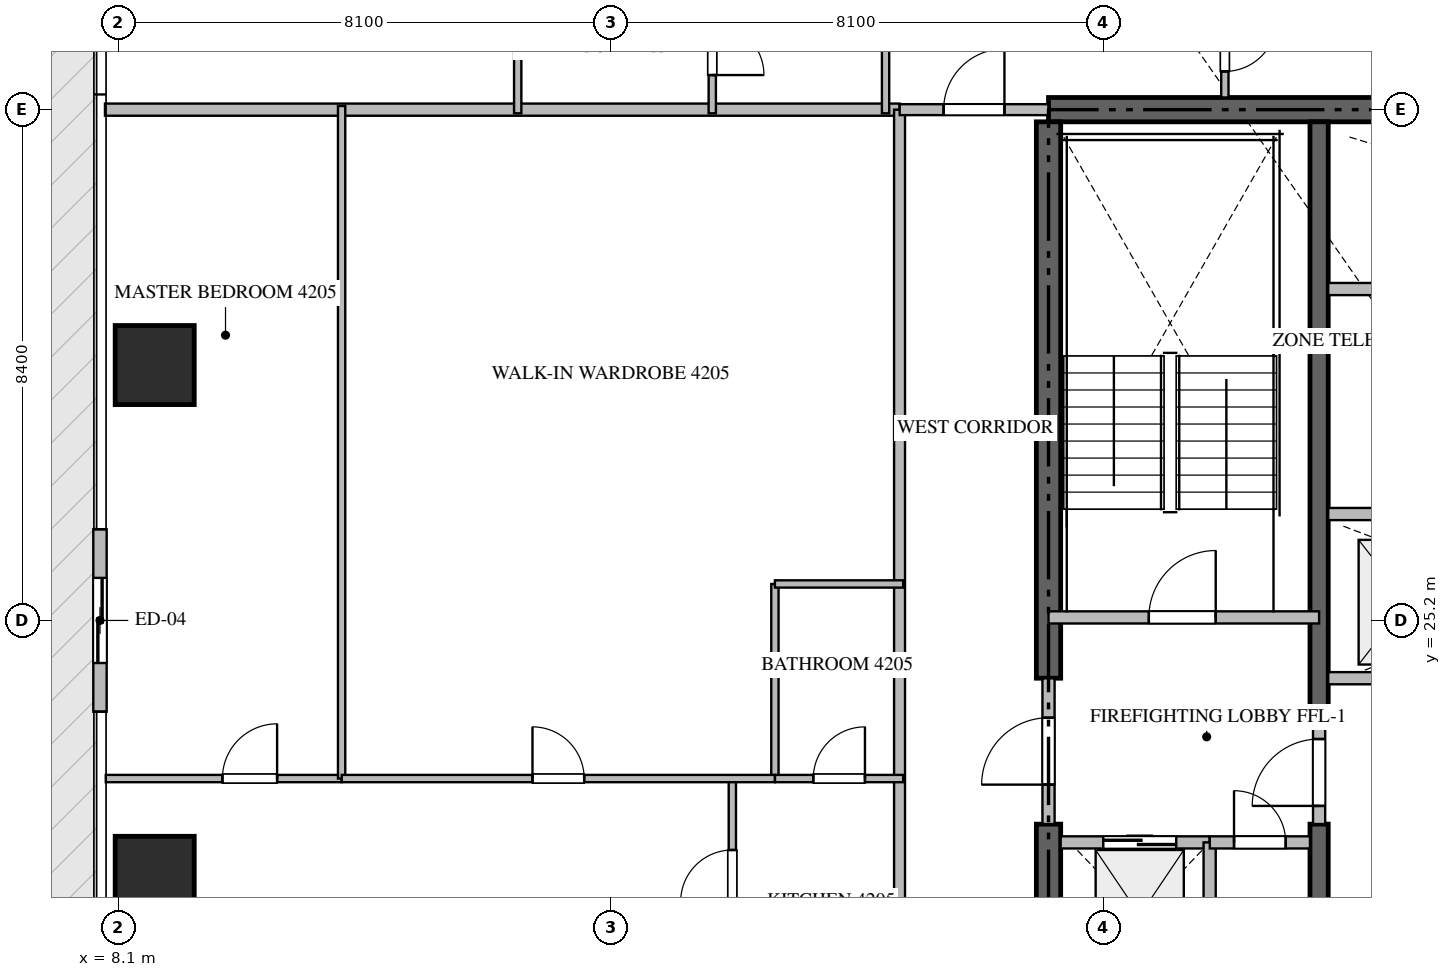
"""IFC4 building model, lengths in metres.
Left out: names, types, materials, properties, quantities, classifications, styles, units other than length and angle.
Written with IfcOpenShell. Run it as: python <this file> out.ifc"""

import sys

from ifc_helpers import new_model, si_unit, direction, frame, frame_2d, origin, origin_2d, place, context, subcontext, project, spatial, rectangle, extrude, source, transform, mapped, element, fill, save


model = new_model("IFC4")
c1 = context("Model", 3, precision=1e-05, world=origin(), true_north=direction((0.0, 1.0)))
c2 = subcontext(c1, "Body", "Model", "MODEL_VIEW")
j1 = project(units=[si_unit("LENGTHUNIT", "METRE"), si_unit("PLANEANGLEUNIT", "RADIAN")], contexts=[c1])
p1 = place(None, origin())
s1 = spatial("IfcSite", under=j1, at=p1, CompositionType="ELEMENT")
p2 = place(p1, origin())
s2 = spatial("IfcBuilding", under=s1, at=p2, CompositionType="ELEMENT")
p3 = place(p2, frame((0.0, 0.0, 168.9)))
s3 = spatial("IfcBuildingStorey", under=s2, at=p3, CompositionType="ELEMENT", Elevation=168.9)
p4 = place(p3, frame((41.4, 33.6, -0.26), z_axis=(0.0, 0.0, 1.0), x_axis=(-1.0, 0.0, 0.0)))
e1 = element("IfcWall", 1, at=p4, inside=s3, PredefinedType="SHEAR", context=c2, shape_type="SweptSolid", body=[
    extrude(rectangle(XDim=18.0, YDim=0.4, at=frame_2d((9.0, 0.0))), origin(), (0.0, 0.0, 1.0), 3.748),
])
p5 = place(p3, frame((23.4, 17.0, -0.26), z_axis=(0.0, 0.0, 1.0), x_axis=(0.0, 1.0, 0.0)))
e2 = element("IfcWall", 2, at=p5, inside=s3, PredefinedType="SHEAR", context=c2, shape_type="SweptSolid", body=[
    extrude(rectangle(XDim=4.85, YDim=0.4, at=frame_2d((2.425, 0.0))), origin(), (0.0, 0.0, 1.0), 3.748),
])
p6 = place(p3, frame((23.4, 24.25, -0.26), z_axis=(0.0, 0.0, 1.0), x_axis=(0.0, 1.0, 0.0)))
e3 = element("IfcWall", 3, at=p6, inside=s3, PredefinedType="SHEAR", context=c2, shape_type="SweptSolid", body=[
    extrude(rectangle(XDim=9.15, YDim=0.4, at=frame_2d((4.575, 0.0))), origin(), (0.0, 0.0, 1.0), 3.748),
])
p7 = place(p3, frame((27.85, 17.0, -0.26), z_axis=(0.0, 0.0, 1.0), x_axis=(0.0, 1.0, 0.0)))
e4 = element("IfcWall", 4, at=p7, inside=s3, PredefinedType="SHEAR", context=c2, shape_type="SweptSolid", body=[
    extrude(rectangle(XDim=4.85, YDim=0.3, at=frame_2d((2.425, 0.0))), origin(), (0.0, 0.0, 1.0), 3.748),
])
p8 = place(p3, frame((27.85, 23.55, -0.26), z_axis=(0.0, 0.0, 1.0), x_axis=(0.0, 1.0, 0.0)))
e5 = element("IfcWall", 5, at=p8, inside=s3, PredefinedType="SHEAR", context=c2, shape_type="SweptSolid", body=[
    extrude(rectangle(XDim=9.85, YDim=0.3, at=frame_2d((4.925, 0.0))), origin(), (0.0, 0.0, 1.0), 3.748),
])
m1 = source(origin(), c2, "Body", "SweptSolid", [
    extrude(rectangle(XDim=1.3, YDim=1.3, at=origin_2d()), origin(), (0.0, 0.0, 1.0), 3.75),
])
for number, where, z_axis, x_axis in (
    (6, (8.7, 21.0, -0.26), (0.0, 0.0, 1.0), (1.0, 0.0, 0.0)),
    (7, (8.7, 29.4, -0.26), (0.0, 0.0, 1.0), (1.0, 0.0, 0.0)),
):
    element("IfcColumn", number, at=place(p3, frame(where, z_axis=z_axis, x_axis=x_axis)), inside=s3, PredefinedType="COLUMN", context=c2, shape_type="MappedRepresentation", body=[
        mapped(m1, transform((0.0, 0.0, 0.0), scale=1.0)),
    ])
p9 = place(p3, frame((7.8, 26.7, 0.0), z_axis=(0.0, 0.0, 1.0), x_axis=(0.0, -1.0, 0.0)))
e8 = element("IfcWall", 8, at=p9, inside=s3, PredefinedType="ELEMENTEDWALL", context=c2, shape_type="SweptSolid", body=[
    extrude(rectangle(XDim=3.0, YDim=0.22, at=frame_2d((1.5, 0.0))), origin(), (0.0, 0.0, 1.0), 3.475),
])
p10 = place(p9, frame((0.8, 0.0, 0.0)))
e9 = element("IfcOpeningElement", 9, at=p10, cuts=e8, PredefinedType="OPENING", context=c2, shape_type="SweptSolid", body=[
    extrude(rectangle(XDim=1.4, YDim=2.25, at=frame_2d((0.7, 1.125))), frame((0.0, 0.12, 0.0), z_axis=(0.0, -1.0, 0.0), x_axis=(1.0, 0.0, 0.0)), (0.0, 0.0, 1.0), 0.24),
])
p11 = place(p3, frame((23.4, 25.25, 0.0), z_axis=(0.0, 0.0, 1.0), x_axis=(1.0, 0.0, 0.0)))
e10 = element("IfcWall", 10, at=p11, inside=s3, PredefinedType="STANDARD", context=c2, shape_type="SweptSolid", body=[
    extrude(rectangle(XDim=4.45, YDim=0.2, at=frame_2d((2.225, 0.0))), origin(), (0.0, 0.0, 1.0), 3.49),
])
p12 = place(p11, frame((1.65, 0.0, 0.0)))
e11 = element("IfcOpeningElement", 11, at=p12, cuts=e10, PredefinedType="OPENING", context=c2, shape_type="SweptSolid", body=[
    extrude(rectangle(XDim=1.1, YDim=2.15, at=frame_2d((0.55, 1.075))), frame((0.0, 0.11, 0.0), z_axis=(0.0, -1.0, 0.0), x_axis=(1.0, 0.0, 0.0)), (0.0, 0.0, 1.0), 0.22),
])
p13 = place(p3, frame((23.6, 21.55, 0.0), z_axis=(0.0, 0.0, 1.0), x_axis=(1.0, 0.0, 0.0)))
e12 = element("IfcWall", 12, at=p13, inside=s3, PredefinedType="STANDARD", context=c2, shape_type="SweptSolid", body=[
    extrude(rectangle(XDim=2.45, YDim=0.2, at=frame_2d((1.225, 0.0))), origin(), (0.0, 0.0, 1.0), 3.49),
])
p14 = place(p13, frame((0.7, 0.0, 0.0)))
e13 = element("IfcOpeningElement", 13, at=p14, cuts=e12, PredefinedType="OPENING", context=c2, shape_type="SweptSolid", body=[
    extrude(rectangle(XDim=1.2, YDim=2.2, at=frame_2d((0.6, 1.1))), frame((0.0, 0.11, 0.0), z_axis=(0.0, -1.0, 0.0), x_axis=(1.0, 0.0, 0.0)), (0.0, 0.0, 1.0), 0.22),
])
p15 = place(p3, frame((28.0, 24.25, 0.0), z_axis=(0.0, 0.0, 1.0), x_axis=(1.0, 0.0, 0.0)))
e14 = element("IfcWall", 14, at=p15, inside=s3, PredefinedType="STANDARD", context=c2, shape_type="SweptSolid", body=[
    extrude(rectangle(XDim=2.425, YDim=0.2, at=frame_2d((1.212, 0.0))), origin(), (0.0, 0.0, 1.0), 3.49),
])
p16 = place(p15, frame((0.75, 0.0, 0.0)))
e15 = element("IfcOpeningElement", 15, at=p16, cuts=e14, PredefinedType="OPENING", context=c2, shape_type="SweptSolid", body=[
    extrude(rectangle(XDim=1.1, YDim=2.2, at=frame_2d((0.55, 1.1))), frame((0.0, 0.11, 0.0), z_axis=(0.0, -1.0, 0.0), x_axis=(1.0, 0.0, 0.0)), (0.0, 0.0, 1.0), 0.22),
])
p17 = place(p3, frame((28.0, 30.65, 0.0), z_axis=(0.0, 0.0, 1.0), x_axis=(1.0, 0.0, 0.0)))
e16 = element("IfcWall", 16, at=p17, inside=s3, PredefinedType="STANDARD", context=c2, shape_type="SweptSolid", body=[
    extrude(rectangle(XDim=2.55, YDim=0.2, at=frame_2d((1.275, 0.0))), origin(), (0.0, 0.0, 1.0), 3.49),
])
p18 = place(p3, frame((26.05, 19.05, 0.0), z_axis=(0.0, 0.0, 1.0), x_axis=(0.0, 1.0, 0.0)))
e17 = element("IfcWall", 17, at=p18, inside=s3, PredefinedType="STANDARD", context=c2, shape_type="SweptSolid", body=[
    extrude(rectangle(XDim=2.5, YDim=0.2, at=frame_2d((1.25, 0.0))), origin(), (0.0, 0.0, 1.0), 3.49),
])
p19 = place(p3, frame((26.052, 21.55, 0.0), z_axis=(0.0, 0.0, 1.0), x_axis=(1.0, 0.0, 0.0)))
e18 = element("IfcWall", 18, at=p19, inside=s3, PredefinedType="STANDARD", context=c2, shape_type="SweptSolid", body=[
    extrude(rectangle(XDim=1.648, YDim=0.2, at=frame_2d((0.824, 0.0))), origin(), (0.0, 0.0, 1.0), 3.49),
])
p20 = place(p19, frame((0.399, 0.0, 0.0)))
e19 = element("IfcOpeningElement", 19, at=p20, cuts=e18, PredefinedType="OPENING", context=c2, shape_type="SweptSolid", body=[
    extrude(rectangle(XDim=0.85, YDim=2.1, at=frame_2d((0.425, 1.05))), frame((0.0, 0.11, 0.0), z_axis=(0.0, -1.0, 0.0), x_axis=(1.0, 0.0, 0.0)), (0.0, 0.0, 1.0), 0.22),
])
p21 = place(p3, frame((23.4, 21.852, 0.0), z_axis=(0.0, 0.0, 1.0), x_axis=(0.0, 1.0, 0.0)))
e20 = element("IfcWall", 20, at=p21, inside=s3, PredefinedType="STANDARD", context=c2, shape_type="SweptSolid", body=[
    extrude(rectangle(XDim=2.396, YDim=0.2, at=frame_2d((1.198, 0.0))), origin(), (0.0, 0.0, 1.0), 3.49),
])
p22 = place(p21, frame((0.648, 0.0, 0.0)))
e21 = element("IfcOpeningElement", 21, at=p22, cuts=e20, PredefinedType="OPENING", context=c2, shape_type="SweptSolid", body=[
    extrude(rectangle(XDim=1.1, YDim=2.15, at=frame_2d((0.55, 1.075))), frame((0.0, 0.11, 0.0), z_axis=(0.0, -1.0, 0.0), x_axis=(1.0, 0.0, 0.0)), (0.0, 0.0, 1.0), 0.22),
])
p23 = place(p3, frame((27.85, 21.852, 0.0), z_axis=(0.0, 0.0, 1.0), x_axis=(0.0, 1.0, 0.0)))
e22 = element("IfcWall", 22, at=p23, inside=s3, PredefinedType="STANDARD", context=c2, shape_type="SweptSolid", body=[
    extrude(rectangle(XDim=1.696, YDim=0.2, at=frame_2d((0.848, 0.0))), origin(), (0.0, 0.0, 1.0), 3.49),
])
p24 = place(p23, frame((0.298, 0.0, 0.0)))
e23 = element("IfcOpeningElement", 23, at=p24, cuts=e22, PredefinedType="OPENING", context=c2, shape_type="SweptSolid", body=[
    extrude(rectangle(XDim=1.1, YDim=2.15, at=frame_2d((0.55, 1.075))), frame((0.0, 0.11, 0.0), z_axis=(0.0, -1.0, 0.0), x_axis=(1.0, 0.0, 0.0)), (0.0, 0.0, 1.0), 0.22),
])
p25 = place(p3, frame((28.0, 26.95, 0.0), z_axis=(0.0, 0.0, 1.0), x_axis=(1.0, 0.0, 0.0)))
e24 = element("IfcWall", 24, at=p25, inside=s3, PredefinedType="STANDARD", context=c2, shape_type="SweptSolid", body=[
    extrude(rectangle(XDim=6.95, YDim=0.2, at=frame_2d((3.475, 0.0))), origin(), (0.0, 0.0, 1.0), 3.49),
])
p26 = place(p3, frame((7.882, 33.6, 0.0), z_axis=(0.0, 0.0, 1.0), x_axis=(1.0, 0.0, 0.0)))
e25 = element("IfcWall", 25, at=p26, inside=s3, PredefinedType="PARTITIONING", context=c2, shape_type="SweptSolid", body=[
    extrude(rectangle(XDim=13.068, YDim=0.2, at=frame_2d((6.534, 0.0))), origin(), (0.0, 0.0, 1.0), 3.49),
])
p27 = place(p3, frame((20.95, 14.9, 0.0), z_axis=(0.0, 0.0, 1.0), x_axis=(0.0, 1.0, 0.0)))
e26 = element("IfcWall", 26, at=p27, inside=s3, PredefinedType="PARTITIONING", context=c2, shape_type="SweptSolid", body=[
    extrude(rectangle(XDim=18.7, YDim=0.18, at=frame_2d((9.35, 0.0))), origin(), (0.0, 0.0, 1.0), 3.49),
])
p28 = place(p27, frame((1.805, 0.0, 0.0)))
e27 = element("IfcOpeningElement", 27, at=p28, cuts=e26, PredefinedType="OPENING", context=c2, shape_type="SweptSolid", body=[
    extrude(rectangle(XDim=1.0, YDim=2.15, at=frame_2d((0.5, 1.075))), frame((0.0, 0.1, 0.0), z_axis=(0.0, -1.0, 0.0), x_axis=(1.0, 0.0, 0.0)), (0.0, 0.0, 1.0), 0.2),
])
p29 = place(p3, frame((20.952, 33.6, 0.0), z_axis=(0.0, 0.0, 1.0), x_axis=(1.0, 0.0, 0.0)))
e28 = element("IfcWall", 28, at=p29, inside=s3, PredefinedType="PARTITIONING", context=c2, shape_type="SweptSolid", body=[
    extrude(rectangle(XDim=2.446, YDim=0.18, at=frame_2d((1.223, 0.0))), origin(), (0.0, 0.0, 1.0), 3.49),
])
p30 = place(p29, frame((0.723, 0.0, 0.0)))
e29 = element("IfcOpeningElement", 29, at=p30, cuts=e28, PredefinedType="OPENING", context=c2, shape_type="SweptSolid", body=[
    extrude(rectangle(XDim=1.0, YDim=2.15, at=frame_2d((0.5, 1.075))), frame((0.0, 0.1, 0.0), z_axis=(0.0, -1.0, 0.0), x_axis=(1.0, 0.0, 0.0)), (0.0, 0.0, 1.0), 0.2),
])
p31 = place(p3, frame((20.72, 36.35, 0.0), z_axis=(0.0, 0.0, 1.0), x_axis=(0.0, -1.0, 0.0)))
e30 = element("IfcWall", 30, at=p31, inside=s3, PredefinedType="PARTITIONING", context=c2, shape_type="SweptSolid", body=[
    extrude(rectangle(XDim=2.81, YDim=0.12, at=frame_2d((1.405, 0.0))), origin(), (0.0, 0.0, 1.0), 3.49),
])
p32 = place(p3, frame((14.67, 35.65, 0.0), z_axis=(0.0, 0.0, 1.0), x_axis=(0.0, -1.0, 0.0)))
e31 = element("IfcWall", 31, at=p32, inside=s3, PredefinedType="PARTITIONING", context=c2, shape_type="SweptSolid", body=[
    extrude(rectangle(XDim=2.11, YDim=0.12, at=frame_2d((1.055, 0.0))), origin(), (0.0, 0.0, 1.0), 3.49),
])
p33 = place(p3, frame((17.87, 35.648, 0.0), z_axis=(0.0, 0.0, 1.0), x_axis=(0.0, -1.0, 0.0)))
e32 = element("IfcWall", 32, at=p33, inside=s3, PredefinedType="PARTITIONING", context=c2, shape_type="SweptSolid", body=[
    extrude(rectangle(XDim=2.108, YDim=0.12, at=frame_2d((1.054, 0.0))), origin(), (0.0, 0.0, 1.0), 3.49),
])
p34 = place(p33, frame((0.629, 0.0, 0.0)))
e33 = element("IfcOpeningElement", 33, at=p34, cuts=e32, PredefinedType="OPENING", context=c2, shape_type="SweptSolid", body=[
    extrude(rectangle(XDim=0.85, YDim=2.1, at=frame_2d((0.425, 1.05))), frame((0.0, 0.07, 0.0), z_axis=(0.0, -1.0, 0.0), x_axis=(1.0, 0.0, 0.0)), (0.0, 0.0, 1.0), 0.14),
])
p35 = place(p3, frame((26.3, 35.648, 0.0), z_axis=(0.0, 0.0, 1.0), x_axis=(0.0, -1.0, 0.0)))
e34 = element("IfcWall", 34, at=p35, inside=s3, PredefinedType="PARTITIONING", context=c2, shape_type="SweptSolid", body=[
    extrude(rectangle(XDim=1.848, YDim=0.12, at=frame_2d((0.924, 0.0))), origin(), (0.0, 0.0, 1.0), 3.49),
])
p36 = place(p35, frame((0.569, 0.0, 0.0)))
e35 = element("IfcOpeningElement", 35, at=p36, cuts=e34, PredefinedType="OPENING", context=c2, shape_type="SweptSolid", body=[
    extrude(rectangle(XDim=0.85, YDim=2.1, at=frame_2d((0.425, 1.05))), frame((0.0, 0.07, 0.0), z_axis=(0.0, -1.0, 0.0), x_axis=(1.0, 0.0, 0.0)), (0.0, 0.0, 1.0), 0.14),
])
p37 = place(p3, frame((18.2, 19.4, 0.0), z_axis=(0.0, 0.0, 1.0), x_axis=(0.0, 1.0, 0.0)))
e36 = element("IfcWall", 36, at=p37, inside=s3, PredefinedType="PARTITIONING", context=c2, shape_type="SweptSolid", body=[
    extrude(rectangle(XDim=3.2, YDim=0.12, at=frame_2d((1.6, 0.0))), origin(), (0.0, 0.0, 1.0), 3.49),
])
p38 = place(p37, frame((1.175, 0.0, 0.0)))
e37 = element("IfcOpeningElement", 37, at=p38, cuts=e36, PredefinedType="OPENING", context=c2, shape_type="SweptSolid", body=[
    extrude(rectangle(XDim=0.85, YDim=2.1, at=frame_2d((0.425, 1.05))), frame((0.0, 0.07, 0.0), z_axis=(0.0, -1.0, 0.0), x_axis=(1.0, 0.0, 0.0)), (0.0, 0.0, 1.0), 0.14),
])
p39 = place(p3, frame((7.895, 22.6, 0.0), z_axis=(0.0, 0.0, 1.0), x_axis=(1.0, 0.0, 0.0)))
e38 = element("IfcWall", 38, at=p39, inside=s3, PredefinedType="PARTITIONING", context=c2, shape_type="SweptSolid", body=[
    extrude(rectangle(XDim=3.879, YDim=0.12, at=frame_2d((1.939, 0.0))), origin(), (0.0, 0.0, 1.0), 3.49),
])
p40 = place(p39, frame((1.918, 0.0, 0.0)))
e39 = element("IfcOpeningElement", 39, at=p40, cuts=e38, PredefinedType="OPENING", context=c2, shape_type="SweptSolid", body=[
    extrude(rectangle(XDim=0.9, YDim=2.1, at=frame_2d((0.45, 1.05))), frame((0.0, 0.07, 0.0), z_axis=(0.0, -1.0, 0.0), x_axis=(1.0, 0.0, 0.0)), (0.0, 0.0, 1.0), 0.14),
])
p41 = place(p3, frame((11.774, 22.6, 0.0), z_axis=(0.0, 0.0, 1.0), x_axis=(0.0, 1.0, 0.0)))
e40 = element("IfcWall", 40, at=p41, inside=s3, PredefinedType="PARTITIONING", context=c2, shape_type="SweptSolid", body=[
    extrude(rectangle(XDim=11.06, YDim=0.12, at=frame_2d((5.53, 0.0))), origin(), (0.0, 0.0, 1.0), 3.49),
])
p42 = place(p3, frame((18.9, 22.6, 0.0), z_axis=(0.0, 0.0, 1.0), x_axis=(0.0, 1.0, 0.0)))
e41 = element("IfcWall", 41, at=p42, inside=s3, PredefinedType="PARTITIONING", context=c2, shape_type="SweptSolid", body=[
    extrude(rectangle(XDim=3.2, YDim=0.12, at=frame_2d((1.6, 0.0))), origin(), (0.0, 0.0, 1.0), 3.49),
])
p43 = place(p3, frame((18.9, 25.8, 0.0), z_axis=(0.0, 0.0, 1.0), x_axis=(1.0, 0.0, 0.0)))
e42 = element("IfcWall", 42, at=p43, inside=s3, PredefinedType="PARTITIONING", context=c2, shape_type="SweptSolid", body=[
    extrude(rectangle(XDim=2.11, YDim=0.12, at=frame_2d((1.055, 0.0))), origin(), (0.0, 0.0, 1.0), 3.49),
])
p44 = place(p3, frame((11.776, 22.6, 0.0), z_axis=(0.0, 0.0, 1.0), x_axis=(1.0, 0.0, 0.0)))
e43 = element("IfcWall", 43, at=p44, inside=s3, PredefinedType="PARTITIONING", context=c2, shape_type="SweptSolid", body=[
    extrude(rectangle(XDim=7.124, YDim=0.12, at=frame_2d((3.562, 0.0))), origin(), (0.0, 0.0, 1.0), 3.49),
])
p45 = place(p44, frame((3.137, 0.0, 0.0)))
e44 = element("IfcOpeningElement", 44, at=p45, cuts=e43, PredefinedType="OPENING", context=c2, shape_type="SweptSolid", body=[
    extrude(rectangle(XDim=0.85, YDim=2.1, at=frame_2d((0.425, 1.05))), frame((0.0, 0.07, 0.0), z_axis=(0.0, -1.0, 0.0), x_axis=(1.0, 0.0, 0.0)), (0.0, 0.0, 1.0), 0.14),
])
p46 = place(p3, frame((18.902, 22.6, 0.0), z_axis=(0.0, 0.0, 1.0), x_axis=(1.0, 0.0, 0.0)))
e45 = element("IfcWall", 45, at=p46, inside=s3, PredefinedType="PARTITIONING", context=c2, shape_type="SweptSolid", body=[
    extrude(rectangle(XDim=2.108, YDim=0.12, at=frame_2d((1.054, 0.0))), origin(), (0.0, 0.0, 1.0), 3.49),
])
p47 = place(p46, frame((0.629, 0.0, 0.0)))
e46 = element("IfcOpeningElement", 46, at=p47, cuts=e45, PredefinedType="OPENING", context=c2, shape_type="SweptSolid", body=[
    extrude(rectangle(XDim=0.85, YDim=2.1, at=frame_2d((0.425, 1.05))), frame((0.0, 0.07, 0.0), z_axis=(0.0, -1.0, 0.0), x_axis=(1.0, 0.0, 0.0)), (0.0, 0.0, 1.0), 0.14),
])
m2 = source(origin(), c2, "Body", "SweptSolid", [
    extrude(rectangle(XDim=1.4, YDim=2.25, at=frame_2d((0.7, 1.125))), frame((0.0, 0.025, 0.0), z_axis=(0.0, -1.0, 0.0), x_axis=(1.0, 0.0, 0.0)), (0.0, 0.0, 1.0), 0.05),
])
p48 = place(p10, origin())
e47 = element("IfcDoor", 47, at=p48, inside=s3, OperationType="SLIDING_TO_LEFT", PredefinedType="DOOR", context=c2, shape_type="MappedRepresentation", body=[
    mapped(m2, transform((0.0, 0.0, 0.0), scale=1.0)),
])
fill(e9, e47)
m3 = source(origin(), c2, "Body", "SweptSolid", [
    extrude(rectangle(XDim=1.1, YDim=2.15, at=frame_2d((0.55, 1.075))), frame((0.0, 0.025, 0.0), z_axis=(0.0, -1.0, 0.0), x_axis=(1.0, 0.0, 0.0)), (0.0, 0.0, 1.0), 0.05),
])
p49 = place(p12, origin())
e48 = element("IfcDoor", 48, at=p49, inside=s3, OperationType="SINGLE_SWING_RIGHT", PredefinedType="DOOR", context=c2, shape_type="MappedRepresentation", body=[
    mapped(m3, transform((0.0, 0.0, 0.0), scale=1.0)),
])
fill(e11, e48)
m4 = source(origin(), c2, "Body", "SweptSolid", [
    extrude(rectangle(XDim=1.2, YDim=2.2, at=frame_2d((0.6, 1.1))), frame((0.0, 0.025, 0.0), z_axis=(0.0, -1.0, 0.0), x_axis=(1.0, 0.0, 0.0)), (0.0, 0.0, 1.0), 0.05),
])
p50 = place(p14, origin())
e49 = element("IfcDoor", 49, at=p50, inside=s3, OperationType="DOUBLE_DOOR_SLIDING", PredefinedType="DOOR", context=c2, shape_type="MappedRepresentation", body=[
    mapped(m4, transform((0.0, 0.0, 0.0), scale=1.0)),
])
fill(e13, e49)
m5 = source(origin(), c2, "Body", "SweptSolid", [
    extrude(rectangle(XDim=0.85, YDim=2.1, at=frame_2d((0.425, 1.05))), frame((0.0, 0.025, 0.0), z_axis=(0.0, -1.0, 0.0), x_axis=(1.0, 0.0, 0.0)), (0.0, 0.0, 1.0), 0.05),
])
p51 = place(p20, origin())
e50 = element("IfcDoor", 50, at=p51, inside=s3, OperationType="SINGLE_SWING_LEFT", PredefinedType="DOOR", context=c2, shape_type="MappedRepresentation", body=[
    mapped(m5, transform((0.0, 0.0, 0.0), scale=1.0)),
])
fill(e19, e50)
p52 = place(p22, origin())
e51 = element("IfcDoor", 51, at=p52, inside=s3, OperationType="SINGLE_SWING_LEFT", PredefinedType="DOOR", context=c2, shape_type="MappedRepresentation", body=[
    mapped(m3, transform((0.0, 0.0, 0.0), scale=1.0)),
])
fill(e21, e51)
p53 = place(p24, origin())
e52 = element("IfcDoor", 52, at=p53, inside=s3, OperationType="SINGLE_SWING_LEFT", PredefinedType="DOOR", context=c2, shape_type="MappedRepresentation", body=[
    mapped(m3, transform((0.0, 0.0, 0.0), scale=1.0)),
])
fill(e23, e52)
m6 = source(origin(), c2, "Body", "SweptSolid", [
    extrude(rectangle(XDim=1.0, YDim=2.15, at=frame_2d((0.5, 1.075))), frame((0.0, 0.025, 0.0), z_axis=(0.0, -1.0, 0.0), x_axis=(1.0, 0.0, 0.0)), (0.0, 0.0, 1.0), 0.05),
])
p54 = place(p30, origin())
e53 = element("IfcDoor", 53, at=p54, inside=s3, OperationType="SINGLE_SWING_RIGHT", PredefinedType="DOOR", context=c2, shape_type="MappedRepresentation", body=[
    mapped(m6, transform((0.0, 0.0, 0.0), scale=1.0)),
])
fill(e29, e53)
p55 = place(p34, origin())
e54 = element("IfcDoor", 54, at=p55, inside=s3, OperationType="SINGLE_SWING_RIGHT", PredefinedType="DOOR", context=c2, shape_type="MappedRepresentation", body=[
    mapped(m5, transform((0.0, 0.0, 0.0), scale=1.0)),
])
fill(e33, e54)
p56 = place(p36, origin())
e55 = element("IfcDoor", 55, at=p56, inside=s3, OperationType="SINGLE_SWING_LEFT", PredefinedType="DOOR", context=c2, shape_type="MappedRepresentation", body=[
    mapped(m5, transform((0.0, 0.0, 0.0), scale=1.0)),
])
fill(e35, e55)
p57 = place(p38, origin())
e56 = element("IfcDoor", 56, at=p57, inside=s3, OperationType="SINGLE_SWING_LEFT", PredefinedType="DOOR", context=c2, shape_type="MappedRepresentation", body=[
    mapped(m5, transform((0.0, 0.0, 0.0), scale=1.0)),
])
fill(e37, e56)
m7 = source(origin(), c2, "Body", "SweptSolid", [
    extrude(rectangle(XDim=0.9, YDim=2.1, at=frame_2d((0.45, 1.05))), frame((0.0, 0.025, 0.0), z_axis=(0.0, -1.0, 0.0), x_axis=(1.0, 0.0, 0.0)), (0.0, 0.0, 1.0), 0.05),
])
p58 = place(p40, origin())
e57 = element("IfcDoor", 57, at=p58, inside=s3, OperationType="SINGLE_SWING_RIGHT", PredefinedType="DOOR", context=c2, shape_type="MappedRepresentation", body=[
    mapped(m7, transform((0.0, 0.0, 0.0), scale=1.0)),
])
fill(e39, e57)
p59 = place(p45, origin())
e58 = element("IfcDoor", 58, at=p59, inside=s3, OperationType="SINGLE_SWING_LEFT", PredefinedType="DOOR", context=c2, shape_type="MappedRepresentation", body=[
    mapped(m5, transform((0.0, 0.0, 0.0), scale=1.0)),
])
fill(e44, e58)
p60 = place(p47, origin())
e59 = element("IfcDoor", 59, at=p60, inside=s3, OperationType="SINGLE_SWING_RIGHT", PredefinedType="DOOR", context=c2, shape_type="MappedRepresentation", body=[
    mapped(m5, transform((0.0, 0.0, 0.0), scale=1.0)),
])
fill(e46, e59)
save(model, sys.argv[1])
